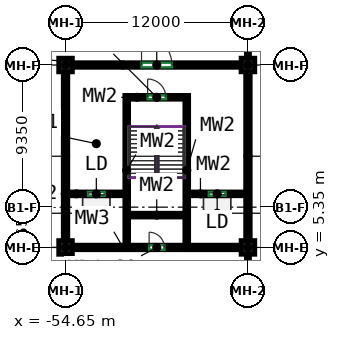
"""IFC4 building model, lengths in metres.
Left out: names, types, materials, properties, quantities, classifications, styles, units other than length and angle.
Written with IfcOpenShell. Run it as: python <this file> out.ifc"""

import sys

from ifc_helpers import new_model, si_unit, direction, frame, frame_2d, origin, origin_2d, place, context, subcontext, project, spatial, rectangle, extrude, source, transform, mapped, element, fill, save


model = new_model("IFC4")
c1 = context("Model", 3, precision=1e-05, world=origin(), true_north=direction((0.0, 1.0)))
c2 = subcontext(c1, "Body", "Model", "MODEL_VIEW")
j1 = project(units=[si_unit("LENGTHUNIT", "METRE"), si_unit("PLANEANGLEUNIT", "RADIAN")], contexts=[c1])
p1 = place(None, origin())
s1 = spatial("IfcSite", under=j1, at=p1, CompositionType="ELEMENT")
p2 = place(p1, origin())
s2 = spatial("IfcBuilding", under=s1, at=p2, CompositionType="ELEMENT")
p3 = place(p2, origin())
s3 = spatial("IfcBuildingStorey", under=s2, at=p3, CompositionType="ELEMENT", Elevation=0.0)
m1 = source(origin(), c2, "Body", "SweptSolid", [
    extrude(rectangle(XDim=0.9, YDim=0.9, at=origin_2d()), origin(), (0.0, 0.0, 1.0), 8.6),
])
for number, where, z_axis, x_axis in (
    (1, (-54.65, 5.35, 0.0), (0.0, 0.0, 1.0), (1.0, 0.0, 0.0)),
    (2, (-54.65, 17.35, 0.0), (0.0, 0.0, 1.0), (1.0, 0.0, 0.0)),
    (3, (-42.65, 5.35, 0.0), (0.0, 0.0, 1.0), (1.0, 0.0, 0.0)),
    (4, (-42.65, 17.35, 0.0), (0.0, 0.0, 1.0), (1.0, 0.0, 0.0)),
):
    element("IfcColumn", number, at=place(p3, frame(where, z_axis=z_axis, x_axis=x_axis)), inside=s3, PredefinedType="COLUMN", context=c2, shape_type="MappedRepresentation", body=[
        mapped(m1, transform((0.0, 0.0, 0.0))),
    ])
m2 = source(origin(), c2, "Body", "SweptSolid", [
    extrude(rectangle(XDim=11.1, YDim=0.3, at=frame_2d((5.55, 0.0))), origin(), (0.0, 0.0, 1.0), 7.7),
])
p4 = place(p3, frame((-54.2, 5.35, 0.0), z_axis=(0.0, 0.0, 1.0), x_axis=(1.0, 0.0, 0.0)))
e5 = element("IfcWall", 5, at=p4, inside=s3, PredefinedType="SHEAR", context=c2, shape_type="MappedRepresentation", body=[
    mapped(m2, transform((0.0, 0.0, 0.0))),
])
p5 = place(p4, frame((5.05, 0.0, 0.0)))
e6 = element("IfcOpeningElement", 6, at=p5, cuts=e5, PredefinedType="OPENING", context=c2, shape_type="SweptSolid", body=[
    extrude(rectangle(XDim=1.0, YDim=2.1, at=frame_2d((0.5, 1.05))), frame((0.0, 0.16, 0.0), z_axis=(0.0, -1.0, 0.0), x_axis=(1.0, 0.0, 0.0)), (0.0, 0.0, 1.0), 0.32),
])
p6 = place(p3, frame((-54.2, 17.35, 0.0), z_axis=(0.0, 0.0, 1.0), x_axis=(1.0, 0.0, 0.0)))
e7 = element("IfcWall", 7, at=p6, inside=s3, PredefinedType="SHEAR", context=c2, shape_type="MappedRepresentation", body=[
    mapped(m2, transform((0.0, 0.0, 0.0))),
])
p7 = place(p6, frame((4.55, 0.0, 0.0)))
e8 = element("IfcOpeningElement", 8, at=p7, cuts=e7, PredefinedType="OPENING", context=c2, shape_type="SweptSolid", body=[
    extrude(rectangle(XDim=2.0, YDim=2.4, at=frame_2d((1.0, 1.2))), frame((0.0, 0.16, 0.0), z_axis=(0.0, -1.0, 0.0), x_axis=(1.0, 0.0, 0.0)), (0.0, 0.0, 1.0), 0.32),
])
for number, where, z_axis, x_axis in (
    (9, (-54.65, 5.8, 0.0), (0.0, 0.0, 1.0), (0.0, 1.0, 0.0)),
    (10, (-42.65, 5.8, 0.0), (0.0, 0.0, 1.0), (0.0, 1.0, 0.0)),
):
    element("IfcWall", number, at=place(p3, frame(where, z_axis=z_axis, x_axis=x_axis)), inside=s3, PredefinedType="SHEAR", context=c2, shape_type="MappedRepresentation", body=[
        mapped(m2, transform((0.0, 0.0, 0.0))),
    ])
m3 = source(origin(), c2, "Body", "SweptSolid", [
    extrude(rectangle(XDim=9.85, YDim=0.25, at=frame_2d((4.925, 0.0))), origin(), (0.0, 0.0, 1.0), 8.6),
])
for number, where, z_axis, x_axis in (
    (11, (-50.625, 5.5, 0.0), (0.0, 0.0, 1.0), (0.0, 1.0, 0.0)),
    (12, (-46.675, 5.5, 0.0), (0.0, 0.0, 1.0), (0.0, 1.0, 0.0)),
):
    element("IfcWall", number, at=place(p3, frame(where, z_axis=z_axis, x_axis=x_axis)), inside=s3, PredefinedType="SHEAR", context=c2, shape_type="MappedRepresentation", body=[
        mapped(m3, transform((0.0, 0.0, 0.0))),
    ])
m4 = source(origin(), c2, "Body", "SweptSolid", [
    extrude(rectangle(XDim=3.7, YDim=0.25, at=frame_2d((1.85, 0.0))), origin(), (0.0, 0.0, 1.0), 8.6),
])
p8 = place(p3, frame((-50.5, 7.475, 0.0), z_axis=(0.0, 0.0, 1.0), x_axis=(1.0, 0.0, 0.0)))
e13 = element("IfcWall", 13, at=p8, inside=s3, PredefinedType="SHEAR", context=c2, shape_type="MappedRepresentation", body=[
    mapped(m4, transform((0.0, 0.0, 0.0))),
])
p9 = place(p3, frame((-50.5, 15.225, 0.0), z_axis=(0.0, 0.0, 1.0), x_axis=(1.0, 0.0, 0.0)))
e14 = element("IfcWall", 14, at=p9, inside=s3, PredefinedType="SHEAR", context=c2, shape_type="MappedRepresentation", body=[
    mapped(m4, transform((0.0, 0.0, 0.0))),
])
p10 = place(p9, frame((1.25, 0.0, 0.0)))
e15 = element("IfcOpeningElement", 15, at=p10, cuts=e14, PredefinedType="OPENING", context=c2, shape_type="SweptSolid", body=[
    extrude(rectangle(XDim=1.2, YDim=2.1, at=frame_2d((0.6, 1.05))), frame((0.0, 0.135, 0.0), z_axis=(0.0, -1.0, 0.0), x_axis=(1.0, 0.0, 0.0)), (0.0, 0.0, 1.0), 0.27),
])
m5 = source(origin(), c2, "Body", "SweptSolid", [
    extrude(rectangle(XDim=3.75, YDim=0.25, at=frame_2d((1.875, 0.0))), origin(), (0.0, 0.0, 1.0), 8.6),
])
p11 = place(p3, frame((-54.5, 8.875, 0.0), z_axis=(0.0, 0.0, 1.0), x_axis=(1.0, 0.0, 0.0)))
e16 = element("IfcWall", 16, at=p11, inside=s3, PredefinedType="SHEAR", context=c2, shape_type="MappedRepresentation", body=[
    mapped(m5, transform((0.0, 0.0, 0.0))),
])
p12 = place(p11, frame((1.325, 0.0, 0.0)))
e17 = element("IfcOpeningElement", 17, at=p12, cuts=e16, PredefinedType="OPENING", context=c2, shape_type="SweptSolid", body=[
    extrude(rectangle(XDim=1.1, YDim=2.1, at=frame_2d((0.55, 1.05))), frame((0.0, 0.135, 0.0), z_axis=(0.0, -1.0, 0.0), x_axis=(1.0, 0.0, 0.0)), (0.0, 0.0, 1.0), 0.27),
])
m6 = source(origin(), c2, "Body", "SweptSolid", [
    extrude(rectangle(XDim=3.5, YDim=0.25, at=frame_2d((1.75, 0.0))), origin(), (0.0, 0.0, 1.0), 8.6),
])
p13 = place(p3, frame((-46.3, 8.875, 0.0), z_axis=(0.0, 0.0, 1.0), x_axis=(1.0, 0.0, 0.0)))
e18 = element("IfcWall", 18, at=p13, inside=s3, PredefinedType="SHEAR", context=c2, shape_type="MappedRepresentation", body=[
    mapped(m6, transform((0.0, 0.0, 0.0))),
])
p14 = place(p13, frame((1.075, 0.0, 0.0)))
e19 = element("IfcOpeningElement", 19, at=p14, cuts=e18, PredefinedType="OPENING", context=c2, shape_type="SweptSolid", body=[
    extrude(rectangle(XDim=1.1, YDim=2.1, at=frame_2d((0.55, 1.05))), frame((0.0, 0.135, 0.0), z_axis=(0.0, -1.0, 0.0), x_axis=(1.0, 0.0, 0.0)), (0.0, 0.0, 1.0), 0.27),
])
m7 = source(origin(), c2, "Body", "SweptSolid", [
    extrude(rectangle(XDim=1.75, YDim=0.2, at=frame_2d((0.875, 0.0))), origin(), (0.0, 0.0, 1.0), 8.6),
])
p15 = place(p3, frame((-56.85, 5.35, 0.0), z_axis=(0.0, 0.0, 1.0), x_axis=(1.0, 0.0, 0.0)))
e20 = element("IfcWall", 20, at=p15, inside=s3, PredefinedType="PARTITIONING", context=c2, shape_type="MappedRepresentation", body=[
    mapped(m7, transform((0.0, 0.0, 0.0))),
])
m8 = source(origin(), c2, "Body", "SweptSolid", [
    extrude(rectangle(XDim=11.1, YDim=0.2, at=frame_2d((5.55, 0.0))), origin(), (0.0, 0.0, 1.0), 7.7),
])
p16 = place(p3, frame((-42.65, -6.2, 0.0), z_axis=(0.0, 0.0, 1.0), x_axis=(0.0, 1.0, 0.0)))
e21 = element("IfcWall", 21, at=p16, inside=s3, PredefinedType="PARTITIONING", context=c2, shape_type="MappedRepresentation", body=[
    mapped(m8, transform((0.0, 0.0, 0.0))),
])
p17 = place(p16, frame((4.95, 0.0, 0.0)))
e22 = element("IfcOpeningElement", 22, at=p17, cuts=e21, PredefinedType="OPENING", context=c2, shape_type="SweptSolid", body=[
    extrude(rectangle(XDim=1.2, YDim=2.1, at=frame_2d((0.6, 1.05))), frame((0.0, 0.11, 0.0), z_axis=(0.0, -1.0, 0.0), x_axis=(1.0, 0.0, 0.0)), (0.0, 0.0, 1.0), 0.22),
])
m9 = source(origin(), c2, "Body", "SweptSolid", [
    extrude(rectangle(XDim=10.25, YDim=0.2, at=frame_2d((5.125, 0.0))), origin(), (0.0, 0.0, 1.0), 7.7),
])
p18 = place(p3, frame((-42.65, 17.8, 0.0), z_axis=(0.0, 0.0, 1.0), x_axis=(0.0, 1.0, 0.0)))
e23 = element("IfcWall", 23, at=p18, inside=s3, PredefinedType="PARTITIONING", context=c2, shape_type="MappedRepresentation", body=[
    mapped(m9, transform((0.0, 0.0, 0.0))),
])
p19 = place(p18, frame((3.925, 0.0, 0.0)))
e24 = element("IfcOpeningElement", 24, at=p19, cuts=e23, PredefinedType="OPENING", context=c2, shape_type="SweptSolid", body=[
    extrude(rectangle(XDim=2.4, YDim=2.4, at=frame_2d((1.2, 1.2))), frame((0.0, 0.11, 0.0), z_axis=(0.0, -1.0, 0.0), x_axis=(1.0, 0.0, 0.0)), (0.0, 0.0, 1.0), 0.22),
])
p20 = place(p10, origin())
e25 = element("IfcDoor", 25, at=p20, inside=s3, OperationType="DOUBLE_DOOR_SINGLE_SWING", PredefinedType="DOOR", context=c2, shape_type="SweptSolid", body=[
    extrude(rectangle(XDim=1.2, YDim=2.1, at=frame_2d((0.6, 1.05))), frame((0.0, 0.025, 0.0), z_axis=(0.0, -1.0, 0.0), x_axis=(1.0, 0.0, 0.0)), (0.0, 0.0, 1.0), 0.05),
])
fill(e15, e25)
p21 = place(p7, origin())
e26 = element("IfcDoor", 26, at=p21, inside=s3, OperationType="DOUBLE_DOOR_SINGLE_SWING", PredefinedType="DOOR", context=c2, shape_type="SweptSolid", body=[
    extrude(rectangle(XDim=2.0, YDim=2.4, at=frame_2d((1.0, 1.2))), frame((0.0, 0.025, 0.0), z_axis=(0.0, -1.0, 0.0), x_axis=(1.0, 0.0, 0.0)), (0.0, 0.0, 1.0), 0.05),
])
fill(e8, e26)
p22 = place(p12, origin())
e27 = element("IfcDoor", 27, at=p22, inside=s3, OperationType="SLIDING_TO_LEFT", PredefinedType="DOOR", context=c2, shape_type="SweptSolid", body=[
    extrude(rectangle(XDim=1.1, YDim=2.1, at=frame_2d((0.55, 1.05))), frame((0.0, 0.025, 0.0), z_axis=(0.0, -1.0, 0.0), x_axis=(1.0, 0.0, 0.0)), (0.0, 0.0, 1.0), 0.05),
])
fill(e17, e27)
p23 = place(p14, origin())
e28 = element("IfcDoor", 28, at=p23, inside=s3, OperationType="SLIDING_TO_LEFT", PredefinedType="DOOR", context=c2, shape_type="SweptSolid", body=[
    extrude(rectangle(XDim=1.1, YDim=2.1, at=frame_2d((0.55, 1.05))), frame((0.0, 0.025, 0.0), z_axis=(0.0, -1.0, 0.0), x_axis=(1.0, 0.0, 0.0)), (0.0, 0.0, 1.0), 0.05),
])
fill(e19, e28)
p24 = place(p5, origin())
e29 = element("IfcDoor", 29, at=p24, inside=s3, OperationType="SINGLE_SWING_LEFT", PredefinedType="DOOR", context=c2, shape_type="SweptSolid", body=[
    extrude(rectangle(XDim=1.0, YDim=2.1, at=frame_2d((0.5, 1.05))), frame((0.0, 0.025, 0.0), z_axis=(0.0, -1.0, 0.0), x_axis=(1.0, 0.0, 0.0)), (0.0, 0.0, 1.0), 0.05),
])
fill(e6, e29)
save(model, sys.argv[1])
